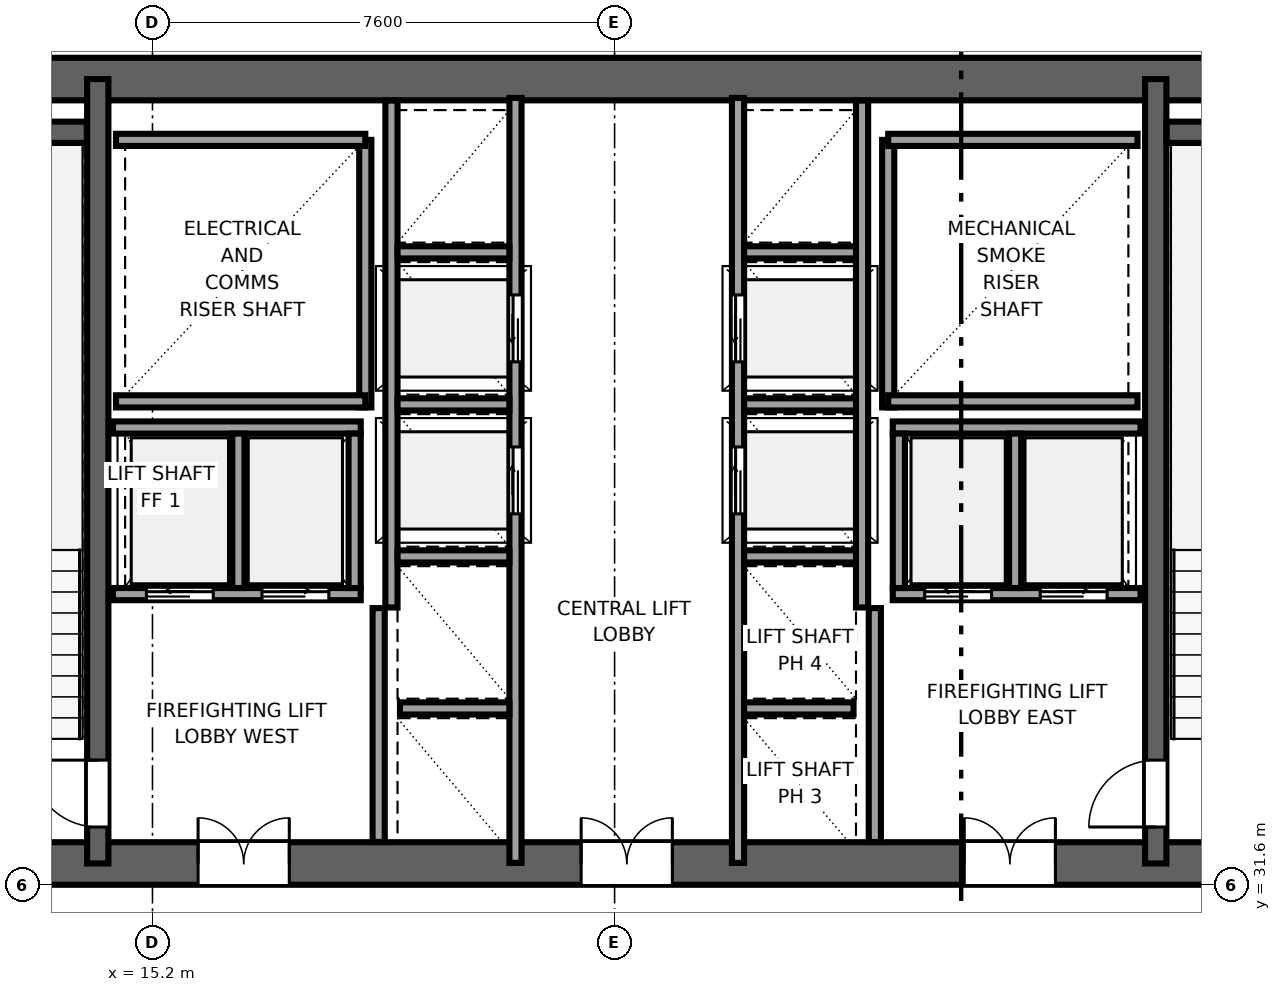
"""IFC4 building model, lengths in metres.
Left out: names, types, materials, properties, quantities, classifications, styles, units other than length and angle.
Written with IfcOpenShell. Run it as: python <this file> out.ifc"""

import sys

from ifc_helpers import new_model, si_unit, direction, frame, frame_2d, origin, place, context, subcontext, project, spatial, rectangle, extrude, source, transform, mapped, element, fill, save


model = new_model("IFC4")
c1 = context("Model", 3, precision=1e-05, world=origin(), true_north=direction((0.0, 1.0)))
c2 = subcontext(c1, "Body", "Model", "MODEL_VIEW")
j1 = project(units=[si_unit("LENGTHUNIT", "METRE"), si_unit("PLANEANGLEUNIT", "RADIAN")], contexts=[c1])
p1 = place(None, origin())
s1 = spatial("IfcSite", under=j1, at=p1, CompositionType="ELEMENT")
p2 = place(p1, origin())
s2 = spatial("IfcBuilding", under=s1, at=p2, CompositionType="ELEMENT")
p3 = place(p2, frame((0.0, 0.0, 171.9)))
s3 = spatial("IfcBuildingStorey", under=s2, at=p3, CompositionType="ELEMENT", Elevation=171.9)
p4 = place(p3, frame((9.8, 31.95, 0.0), z_axis=(0.0, 0.0, 1.0), x_axis=(1.0, 0.0, 0.0)))
e1 = element("IfcWall", 1, at=p4, inside=s3, PredefinedType="SHEAR", context=c2, shape_type="SweptSolid", body=[
    extrude(rectangle(XDim=26.4, YDim=0.7, at=frame_2d((13.2, 0.0))), origin(), (0.0, 0.0, 1.0), 3.55),
])
p5 = place(p4, frame((7.65, 0.0, 0.0), z_axis=(0.0, 0.0, 1.0), x_axis=(-1.0, 0.0, 0.0)))
e2 = element("IfcOpeningElement", 2, at=p5, cuts=e1, PredefinedType="OPENING", context=c2, shape_type="SweptSolid", body=[
    extrude(rectangle(XDim=1.5, YDim=2.04, at=frame_2d((0.75, 1.02))), frame((0.0, 0.36, 0.0), z_axis=(0.0, -1.0, 0.0), x_axis=(1.0, 0.0, 0.0)), (0.0, 0.0, 1.0), 0.72),
])
p6 = place(p4, frame((13.95, 0.0, 0.0), z_axis=(0.0, 0.0, 1.0), x_axis=(-1.0, 0.0, 0.0)))
e3 = element("IfcOpeningElement", 3, at=p6, cuts=e1, PredefinedType="OPENING", context=c2, shape_type="SweptSolid", body=[
    extrude(rectangle(XDim=1.5, YDim=2.04, at=frame_2d((0.75, 1.02))), frame((0.0, 0.36, 0.0), z_axis=(0.0, -1.0, 0.0), x_axis=(1.0, 0.0, 0.0)), (0.0, 0.0, 1.0), 0.72),
])
p7 = place(p4, frame((20.25, 0.0, 0.0), z_axis=(0.0, 0.0, 1.0), x_axis=(-1.0, 0.0, 0.0)))
e4 = element("IfcOpeningElement", 4, at=p7, cuts=e1, PredefinedType="OPENING", context=c2, shape_type="SweptSolid", body=[
    extrude(rectangle(XDim=1.5, YDim=2.04, at=frame_2d((0.75, 1.02))), frame((0.0, 0.36, 0.0), z_axis=(0.0, -1.0, 0.0), x_axis=(1.0, 0.0, 0.0)), (0.0, 0.0, 1.0), 0.72),
])
p8 = place(p3, frame((9.8, 44.85, 0.0), z_axis=(0.0, 0.0, 1.0), x_axis=(1.0, 0.0, 0.0)))
e5 = element("IfcWall", 5, at=p8, inside=s3, PredefinedType="SHEAR", context=c2, shape_type="SweptSolid", body=[
    extrude(rectangle(XDim=26.4, YDim=0.7, at=frame_2d((13.2, 0.0))), origin(), (0.0, 0.0, 1.0), 3.55),
])
p9 = place(p3, frame((14.3, 31.95, 0.0), z_axis=(0.0, 0.0, 1.0), x_axis=(0.0, 1.0, 0.0)))
e6 = element("IfcWall", 6, at=p9, inside=s3, PredefinedType="SHEAR", context=c2, shape_type="SweptSolid", body=[
    extrude(rectangle(XDim=12.9, YDim=0.35, at=frame_2d((6.45, 0.0))), origin(), (0.0, 0.0, 1.0), 3.55),
])
p10 = place(p9, frame((0.6, 0.0, 0.0)))
e7 = element("IfcOpeningElement", 7, at=p10, cuts=e6, PredefinedType="OPENING", context=c2, shape_type="SweptSolid", body=[
    extrude(rectangle(XDim=1.1, YDim=2.12, at=frame_2d((0.55, 1.06))), frame((0.0, 0.185, 0.0), z_axis=(0.0, -1.0, 0.0), x_axis=(1.0, 0.0, 0.0)), (0.0, 0.0, 1.0), 0.37),
])
p11 = place(p3, frame((31.7, 31.95, 0.0), z_axis=(0.0, 0.0, 1.0), x_axis=(0.0, 1.0, 0.0)))
e8 = element("IfcWall", 8, at=p11, inside=s3, PredefinedType="SHEAR", context=c2, shape_type="SweptSolid", body=[
    extrude(rectangle(XDim=12.9, YDim=0.35, at=frame_2d((6.45, 0.0))), origin(), (0.0, 0.0, 1.0), 3.55),
])
p12 = place(p11, frame((1.7, 0.0, 0.0), z_axis=(0.0, 0.0, 1.0), x_axis=(-1.0, 0.0, 0.0)))
e9 = element("IfcOpeningElement", 9, at=p12, cuts=e8, PredefinedType="OPENING", context=c2, shape_type="SweptSolid", body=[
    extrude(rectangle(XDim=1.1, YDim=2.12, at=frame_2d((0.55, 1.06))), frame((0.0, 0.185, 0.0), z_axis=(0.0, -1.0, 0.0), x_axis=(1.0, 0.0, 0.0)), (0.0, 0.0, 1.0), 0.37),
])
for number, where, z_axis, x_axis in (
    (10, (10.52, 43.975, 0.0), (0.0, 0.0, 1.0), (1.0, 0.0, 0.0)),
    (11, (31.88, 43.975, 0.0), (0.0, 0.0, 1.0), (1.0, 0.0, 0.0)),
):
    element("IfcWall", number, at=place(p3, frame(where, z_axis=z_axis, x_axis=x_axis)), inside=s3, PredefinedType="SHEAR", context=c2, shape_type="SweptSolid", body=[
        extrude(rectangle(XDim=3.6, YDim=0.35, at=frame_2d((1.8, 0.0))), origin(), (0.0, 0.0, 1.0), 3.55),
    ])
p13 = place(p3, frame((18.7, 39.45, 0.0), z_axis=(0.0, 0.0, 1.0), x_axis=(0.0, 1.0, 0.0)))
e12 = element("IfcWall", 12, at=p13, inside=s3, PredefinedType="SOLIDWALL", context=c2, shape_type="SweptSolid", body=[
    extrude(rectangle(XDim=4.4, YDim=0.2, at=frame_2d((2.2, 0.0))), origin(), (0.0, 0.0, 1.0), 3.37),
])
for number, where, z_axis, x_axis in (
    (13, (14.6, 39.55, 0.0), (0.0, 0.0, 1.0), (1.0, 0.0, 0.0)),
    (14, (14.6, 43.85, 0.0), (0.0, 0.0, 1.0), (1.0, 0.0, 0.0)),
):
    element("IfcWall", number, at=place(p3, frame(where, z_axis=z_axis, x_axis=x_axis)), inside=s3, PredefinedType="SOLIDWALL", context=c2, shape_type="SweptSolid", body=[
        extrude(rectangle(XDim=4.1, YDim=0.2, at=frame_2d((2.05, 0.0))), origin(), (0.0, 0.0, 1.0), 3.37),
    ])
p14 = place(p3, frame((27.3, 39.45, 0.0), z_axis=(0.0, 0.0, 1.0), x_axis=(0.0, 1.0, 0.0)))
e15 = element("IfcWall", 15, at=p14, inside=s3, PredefinedType="SOLIDWALL", context=c2, shape_type="SweptSolid", body=[
    extrude(rectangle(XDim=4.4, YDim=0.2, at=frame_2d((2.2, 0.0))), origin(), (0.0, 0.0, 1.0), 3.37),
])
for number, where, z_axis, x_axis in (
    (16, (27.3, 39.55, 0.0), (0.0, 0.0, 1.0), (1.0, 0.0, 0.0)),
    (17, (27.3, 43.85, 0.0), (0.0, 0.0, 1.0), (1.0, 0.0, 0.0)),
):
    element("IfcWall", number, at=place(p3, frame(where, z_axis=z_axis, x_axis=x_axis)), inside=s3, PredefinedType="SOLIDWALL", context=c2, shape_type="SweptSolid", body=[
        extrude(rectangle(XDim=4.1, YDim=0.2, at=frame_2d((2.05, 0.0))), origin(), (0.0, 0.0, 1.0), 3.37),
    ])
for number, where, z_axis, x_axis in (
    (18, (18.92, 32.304, 0.0), (0.0, 0.0, 1.0), (0.0, 1.0, 0.0)),
    (19, (27.08, 32.304, 0.0), (0.0, 0.0, 1.0), (0.0, 1.0, 0.0)),
):
    element("IfcWall", number, at=place(p3, frame(where, z_axis=z_axis, x_axis=x_axis)), inside=s3, PredefinedType="SOLIDWALL", context=c2, shape_type="SweptSolid", body=[
        extrude(rectangle(XDim=3.846, YDim=0.2, at=frame_2d((1.923, 0.0))), origin(), (0.0, 0.0, 1.0), 3.37),
    ])
p15 = place(p3, frame((21.17, 31.96, 0.0), z_axis=(0.0, 0.0, 1.0), x_axis=(0.0, 1.0, 0.0)))
e20 = element("IfcWall", 20, at=p15, inside=s3, PredefinedType="SOLIDWALL", context=c2, shape_type="SweptSolid", body=[
    extrude(rectangle(XDim=12.58, YDim=0.2, at=frame_2d((6.29, 0.0))), origin(), (0.0, 0.0, 1.0), 3.37),
])
p16 = place(p15, frame((5.74, 0.0, 0.0)))
e21 = element("IfcOpeningElement", 21, at=p16, cuts=e20, PredefinedType="OPENING", context=c2, shape_type="SweptSolid", body=[
    extrude(rectangle(XDim=1.1, YDim=2.12, at=frame_2d((0.55, 1.06))), frame((0.0, 0.11, 0.0), z_axis=(0.0, -1.0, 0.0), x_axis=(1.0, 0.0, 0.0)), (0.0, 0.0, 1.0), 0.22),
])
p17 = place(p15, frame((8.24, 0.0, 0.0)))
e22 = element("IfcOpeningElement", 22, at=p17, cuts=e20, PredefinedType="OPENING", context=c2, shape_type="SweptSolid", body=[
    extrude(rectangle(XDim=1.1, YDim=2.12, at=frame_2d((0.55, 1.06))), frame((0.0, 0.11, 0.0), z_axis=(0.0, -1.0, 0.0), x_axis=(1.0, 0.0, 0.0)), (0.0, 0.0, 1.0), 0.22),
])
p18 = place(p3, frame((19.13, 36.16, 0.0), z_axis=(0.0, 0.0, 1.0), x_axis=(0.0, 1.0, 0.0)))
e23 = element("IfcWall", 23, at=p18, inside=s3, PredefinedType="SOLIDWALL", context=c2, shape_type="SweptSolid", body=[
    extrude(rectangle(XDim=8.336, YDim=0.2, at=frame_2d((4.168, 0.0))), origin(), (0.0, 0.0, 1.0), 3.37),
])
p19 = place(p3, frame((19.27, 34.5, 0.0), z_axis=(0.0, 0.0, 1.0), x_axis=(1.0, 0.0, 0.0)))
e24 = element("IfcWall", 24, at=p19, inside=s3, PredefinedType="SOLIDWALL", context=c2, shape_type="SweptSolid", body=[
    extrude(rectangle(XDim=1.8, YDim=0.2, at=frame_2d((0.9, 0.0))), origin(), (0.0, 0.0, 1.0), 3.37),
])
for number, where, z_axis, x_axis in (
    (25, (19.23, 37.0, 0.0), (0.0, 0.0, 1.0), (1.0, 0.0, 0.0)),
    (26, (19.23, 39.5, 0.0), (0.0, 0.0, 1.0), (1.0, 0.0, 0.0)),
    (27, (19.23, 42.0, 0.0), (0.0, 0.0, 1.0), (1.0, 0.0, 0.0)),
):
    element("IfcWall", number, at=place(p3, frame(where, z_axis=z_axis, x_axis=x_axis)), inside=s3, PredefinedType="SOLIDWALL", context=c2, shape_type="SweptSolid", body=[
        extrude(rectangle(XDim=1.84, YDim=0.2, at=frame_2d((0.92, 0.0))), origin(), (0.0, 0.0, 1.0), 3.37),
    ])
p20 = place(p3, frame((27.375, 36.38, 0.0), z_axis=(0.0, 0.0, 1.0), x_axis=(1.0, 0.0, 0.0)))
e28 = element("IfcWall", 28, at=p20, inside=s3, PredefinedType="SOLIDWALL", context=c2, shape_type="SweptSolid", body=[
    extrude(rectangle(XDim=4.075, YDim=0.2, at=frame_2d((2.038, 0.0))), origin(), (0.0, 0.0, 1.0), 3.37),
])
p21 = place(p20, frame((0.525, 0.0, 0.0)))
e29 = element("IfcOpeningElement", 29, at=p21, cuts=e28, PredefinedType="OPENING", context=c2, shape_type="SweptSolid", body=[
    extrude(rectangle(XDim=1.1, YDim=2.12, at=frame_2d((0.55, 1.06))), frame((0.0, 0.11, 0.0), z_axis=(0.0, -1.0, 0.0), x_axis=(1.0, 0.0, 0.0)), (0.0, 0.0, 1.0), 0.22),
])
p22 = place(p20, frame((2.425, 0.0, 0.0)))
e30 = element("IfcOpeningElement", 30, at=p22, cuts=e28, PredefinedType="OPENING", context=c2, shape_type="SweptSolid", body=[
    extrude(rectangle(XDim=1.1, YDim=2.12, at=frame_2d((0.55, 1.06))), frame((0.0, 0.11, 0.0), z_axis=(0.0, -1.0, 0.0), x_axis=(1.0, 0.0, 0.0)), (0.0, 0.0, 1.0), 0.22),
])
p23 = place(p3, frame((27.375, 39.12, 0.0), z_axis=(0.0, 0.0, 1.0), x_axis=(1.0, 0.0, 0.0)))
e31 = element("IfcWall", 31, at=p23, inside=s3, PredefinedType="SOLIDWALL", context=c2, shape_type="SweptSolid", body=[
    extrude(rectangle(XDim=4.075, YDim=0.2, at=frame_2d((2.038, 0.0))), origin(), (0.0, 0.0, 1.0), 3.37),
])
for number, where, z_axis, x_axis in (
    (32, (27.475, 36.48, 0.0), (0.0, 0.0, 1.0), (0.0, 1.0, 0.0)),
    (33, (29.387, 36.48, 0.0), (0.0, 0.0, 1.0), (0.0, 1.0, 0.0)),
):
    element("IfcWall", number, at=place(p3, frame(where, z_axis=z_axis, x_axis=x_axis)), inside=s3, PredefinedType="SOLIDWALL", context=c2, shape_type="SweptSolid", body=[
        extrude(rectangle(XDim=2.54, YDim=0.2, at=frame_2d((1.27, 0.0))), origin(), (0.0, 0.0, 1.0), 3.37),
    ])
p24 = place(p3, frame((14.55, 36.38, 0.0), z_axis=(0.0, 0.0, 1.0), x_axis=(1.0, 0.0, 0.0)))
e34 = element("IfcWall", 34, at=p24, inside=s3, PredefinedType="SOLIDWALL", context=c2, shape_type="SweptSolid", body=[
    extrude(rectangle(XDim=4.075, YDim=0.2, at=frame_2d((2.038, 0.0))), origin(), (0.0, 0.0, 1.0), 3.37),
])
p25 = place(p24, frame((0.55, 0.0, 0.0)))
e35 = element("IfcOpeningElement", 35, at=p25, cuts=e34, PredefinedType="OPENING", context=c2, shape_type="SweptSolid", body=[
    extrude(rectangle(XDim=1.1, YDim=2.12, at=frame_2d((0.55, 1.06))), frame((0.0, 0.11, 0.0), z_axis=(0.0, -1.0, 0.0), x_axis=(1.0, 0.0, 0.0)), (0.0, 0.0, 1.0), 0.22),
])
p26 = place(p24, frame((2.45, 0.0, 0.0)))
e36 = element("IfcOpeningElement", 36, at=p26, cuts=e34, PredefinedType="OPENING", context=c2, shape_type="SweptSolid", body=[
    extrude(rectangle(XDim=1.1, YDim=2.12, at=frame_2d((0.55, 1.06))), frame((0.0, 0.11, 0.0), z_axis=(0.0, -1.0, 0.0), x_axis=(1.0, 0.0, 0.0)), (0.0, 0.0, 1.0), 0.22),
])
p27 = place(p3, frame((14.55, 39.12, 0.0), z_axis=(0.0, 0.0, 1.0), x_axis=(1.0, 0.0, 0.0)))
e37 = element("IfcWall", 37, at=p27, inside=s3, PredefinedType="SOLIDWALL", context=c2, shape_type="SweptSolid", body=[
    extrude(rectangle(XDim=4.075, YDim=0.2, at=frame_2d((2.038, 0.0))), origin(), (0.0, 0.0, 1.0), 3.37),
])
for number, where, z_axis, x_axis in (
    (38, (18.525, 36.48, 0.0), (0.0, 0.0, 1.0), (0.0, 1.0, 0.0)),
    (39, (16.613, 36.48, 0.0), (0.0, 0.0, 1.0), (0.0, 1.0, 0.0)),
):
    element("IfcWall", number, at=place(p3, frame(where, z_axis=z_axis, x_axis=x_axis)), inside=s3, PredefinedType="SOLIDWALL", context=c2, shape_type="SweptSolid", body=[
        extrude(rectangle(XDim=2.54, YDim=0.2, at=frame_2d((1.27, 0.0))), origin(), (0.0, 0.0, 1.0), 3.37),
    ])
p28 = place(p3, frame((24.83, 31.96, 0.0), z_axis=(0.0, 0.0, 1.0), x_axis=(0.0, 1.0, 0.0)))
e40 = element("IfcWall", 40, at=p28, inside=s3, PredefinedType="SOLIDWALL", context=c2, shape_type="SweptSolid", body=[
    extrude(rectangle(XDim=12.58, YDim=0.2, at=frame_2d((6.29, 0.0))), origin(), (0.0, 0.0, 1.0), 3.37),
])
p29 = place(p28, frame((5.74, 0.0, 0.0)))
e41 = element("IfcOpeningElement", 41, at=p29, cuts=e40, PredefinedType="OPENING", context=c2, shape_type="SweptSolid", body=[
    extrude(rectangle(XDim=1.1, YDim=2.12, at=frame_2d((0.55, 1.06))), frame((0.0, 0.11, 0.0), z_axis=(0.0, -1.0, 0.0), x_axis=(1.0, 0.0, 0.0)), (0.0, 0.0, 1.0), 0.22),
])
p30 = place(p28, frame((8.24, 0.0, 0.0)))
e42 = element("IfcOpeningElement", 42, at=p30, cuts=e40, PredefinedType="OPENING", context=c2, shape_type="SweptSolid", body=[
    extrude(rectangle(XDim=1.1, YDim=2.12, at=frame_2d((0.55, 1.06))), frame((0.0, 0.11, 0.0), z_axis=(0.0, -1.0, 0.0), x_axis=(1.0, 0.0, 0.0)), (0.0, 0.0, 1.0), 0.22),
])
p31 = place(p3, frame((26.87, 36.16, 0.0), z_axis=(0.0, 0.0, 1.0), x_axis=(0.0, 1.0, 0.0)))
e43 = element("IfcWall", 43, at=p31, inside=s3, PredefinedType="SOLIDWALL", context=c2, shape_type="SweptSolid", body=[
    extrude(rectangle(XDim=8.336, YDim=0.2, at=frame_2d((4.168, 0.0))), origin(), (0.0, 0.0, 1.0), 3.37),
])
p32 = place(p3, frame((24.93, 34.5, 0.0), z_axis=(0.0, 0.0, 1.0), x_axis=(1.0, 0.0, 0.0)))
e44 = element("IfcWall", 44, at=p32, inside=s3, PredefinedType="SOLIDWALL", context=c2, shape_type="SweptSolid", body=[
    extrude(rectangle(XDim=1.8, YDim=0.2, at=frame_2d((0.9, 0.0))), origin(), (0.0, 0.0, 1.0), 3.37),
])
for number, where, z_axis, x_axis in (
    (45, (24.93, 37.0, 0.0), (0.0, 0.0, 1.0), (1.0, 0.0, 0.0)),
    (46, (24.93, 39.5, 0.0), (0.0, 0.0, 1.0), (1.0, 0.0, 0.0)),
    (47, (24.93, 42.0, 0.0), (0.0, 0.0, 1.0), (1.0, 0.0, 0.0)),
):
    element("IfcWall", number, at=place(p3, frame(where, z_axis=z_axis, x_axis=x_axis)), inside=s3, PredefinedType="SOLIDWALL", context=c2, shape_type="SweptSolid", body=[
        extrude(rectangle(XDim=1.84, YDim=0.2, at=frame_2d((0.92, 0.0))), origin(), (0.0, 0.0, 1.0), 3.37),
    ])
m1 = source(origin(), c2, "Body", "SweptSolid", [
    extrude(rectangle(XDim=1.1, YDim=2.12, at=frame_2d((0.55, 1.06))), frame((0.0, 0.025, 0.0), z_axis=(0.0, -1.0, 0.0), x_axis=(1.0, 0.0, 0.0)), (0.0, 0.0, 1.0), 0.05),
])
p33 = place(p10, origin())
e48 = element("IfcDoor", 48, at=p33, inside=s3, OperationType="SINGLE_SWING_RIGHT", PredefinedType="DOOR", context=c2, shape_type="MappedRepresentation", body=[
    mapped(m1, transform((0.0, 0.0, 0.0), x_axis=(1.0, 0.0, 0.0), y_axis=(0.0, 1.0, 0.0), z_axis=(0.0, 0.0, 1.0), scale=1.0)),
])
fill(e7, e48)
p34 = place(p12, origin())
e49 = element("IfcDoor", 49, at=p34, inside=s3, OperationType="SINGLE_SWING_LEFT", PredefinedType="DOOR", context=c2, shape_type="MappedRepresentation", body=[
    mapped(m1, transform((0.0, 0.0, 0.0), x_axis=(1.0, 0.0, 0.0), y_axis=(0.0, 1.0, 0.0), z_axis=(0.0, 0.0, 1.0), scale=1.0)),
])
fill(e9, e49)
m2 = source(origin(), c2, "Body", "SweptSolid", [
    extrude(rectangle(XDim=1.5, YDim=2.04, at=frame_2d((0.75, 1.02))), frame((0.0, 0.025, 0.0), z_axis=(0.0, -1.0, 0.0), x_axis=(1.0, 0.0, 0.0)), (0.0, 0.0, 1.0), 0.05),
])
p35 = place(p5, origin())
e50 = element("IfcDoor", 50, at=p35, inside=s3, OperationType="DOUBLE_DOOR_SINGLE_SWING", PredefinedType="DOOR", context=c2, shape_type="MappedRepresentation", body=[
    mapped(m2, transform((0.0, 0.0, 0.0), x_axis=(1.0, 0.0, 0.0), y_axis=(0.0, 1.0, 0.0), z_axis=(0.0, 0.0, 1.0), scale=1.0)),
])
fill(e2, e50)
p36 = place(p6, origin())
e51 = element("IfcDoor", 51, at=p36, inside=s3, OperationType="DOUBLE_DOOR_SINGLE_SWING", PredefinedType="DOOR", context=c2, shape_type="MappedRepresentation", body=[
    mapped(m2, transform((0.0, 0.0, 0.0), x_axis=(1.0, 0.0, 0.0), y_axis=(0.0, 1.0, 0.0), z_axis=(0.0, 0.0, 1.0), scale=1.0)),
])
fill(e3, e51)
p37 = place(p7, origin())
e52 = element("IfcDoor", 52, at=p37, inside=s3, OperationType="DOUBLE_DOOR_SINGLE_SWING", PredefinedType="DOOR", context=c2, shape_type="MappedRepresentation", body=[
    mapped(m2, transform((0.0, 0.0, 0.0), x_axis=(1.0, 0.0, 0.0), y_axis=(0.0, 1.0, 0.0), z_axis=(0.0, 0.0, 1.0), scale=1.0)),
])
fill(e4, e52)
m3 = source(origin(), c2, "Body", "SweptSolid", [
    extrude(rectangle(XDim=1.1, YDim=2.12, at=frame_2d((0.55, 1.06))), frame((0.0, 0.025, 0.0), z_axis=(0.0, -1.0, 0.0), x_axis=(1.0, 0.0, 0.0)), (0.0, 0.0, 1.0), 0.05),
])
p38 = place(p16, origin())
e53 = element("IfcDoor", 53, at=p38, inside=s3, OperationType="SLIDING_TO_RIGHT", PredefinedType="DOOR", context=c2, shape_type="MappedRepresentation", body=[
    mapped(m3, transform((0.0, 0.0, 0.0), x_axis=(1.0, 0.0, 0.0), y_axis=(0.0, 1.0, 0.0), z_axis=(0.0, 0.0, 1.0), scale=1.0)),
])
fill(e21, e53)
p39 = place(p17, origin())
e54 = element("IfcDoor", 54, at=p39, inside=s3, OperationType="SLIDING_TO_LEFT", PredefinedType="DOOR", context=c2, shape_type="MappedRepresentation", body=[
    mapped(m3, transform((0.0, 0.0, 0.0), x_axis=(1.0, 0.0, 0.0), y_axis=(0.0, 1.0, 0.0), z_axis=(0.0, 0.0, 1.0), scale=1.0)),
])
fill(e22, e54)
p40 = place(p21, origin())
e55 = element("IfcDoor", 55, at=p40, inside=s3, OperationType="SLIDING_TO_LEFT", PredefinedType="DOOR", context=c2, shape_type="MappedRepresentation", body=[
    mapped(m3, transform((0.0, 0.0, 0.0), x_axis=(1.0, 0.0, 0.0), y_axis=(0.0, 1.0, 0.0), z_axis=(0.0, 0.0, 1.0), scale=1.0)),
])
fill(e29, e55)
p41 = place(p22, origin())
e56 = element("IfcDoor", 56, at=p41, inside=s3, OperationType="SLIDING_TO_RIGHT", PredefinedType="DOOR", context=c2, shape_type="MappedRepresentation", body=[
    mapped(m3, transform((0.0, 0.0, 0.0), x_axis=(1.0, 0.0, 0.0), y_axis=(0.0, 1.0, 0.0), z_axis=(0.0, 0.0, 1.0), scale=1.0)),
])
fill(e30, e56)
p42 = place(p25, origin())
e57 = element("IfcDoor", 57, at=p42, inside=s3, OperationType="SLIDING_TO_LEFT", PredefinedType="DOOR", context=c2, shape_type="MappedRepresentation", body=[
    mapped(m3, transform((0.0, 0.0, 0.0), x_axis=(1.0, 0.0, 0.0), y_axis=(0.0, 1.0, 0.0), z_axis=(0.0, 0.0, 1.0), scale=1.0)),
])
fill(e35, e57)
p43 = place(p26, origin())
e58 = element("IfcDoor", 58, at=p43, inside=s3, OperationType="SLIDING_TO_RIGHT", PredefinedType="DOOR", context=c2, shape_type="MappedRepresentation", body=[
    mapped(m3, transform((0.0, 0.0, 0.0), x_axis=(1.0, 0.0, 0.0), y_axis=(0.0, 1.0, 0.0), z_axis=(0.0, 0.0, 1.0), scale=1.0)),
])
fill(e36, e58)
p44 = place(p29, origin())
e59 = element("IfcDoor", 59, at=p44, inside=s3, OperationType="SLIDING_TO_RIGHT", PredefinedType="DOOR", context=c2, shape_type="MappedRepresentation", body=[
    mapped(m3, transform((0.0, 0.0, 0.0), x_axis=(1.0, 0.0, 0.0), y_axis=(0.0, 1.0, 0.0), z_axis=(0.0, 0.0, 1.0), scale=1.0)),
])
fill(e41, e59)
p45 = place(p30, origin())
e60 = element("IfcDoor", 60, at=p45, inside=s3, OperationType="SLIDING_TO_LEFT", PredefinedType="DOOR", context=c2, shape_type="MappedRepresentation", body=[
    mapped(m3, transform((0.0, 0.0, 0.0), x_axis=(1.0, 0.0, 0.0), y_axis=(0.0, 1.0, 0.0), z_axis=(0.0, 0.0, 1.0), scale=1.0)),
])
fill(e42, e60)
save(model, sys.argv[1])
